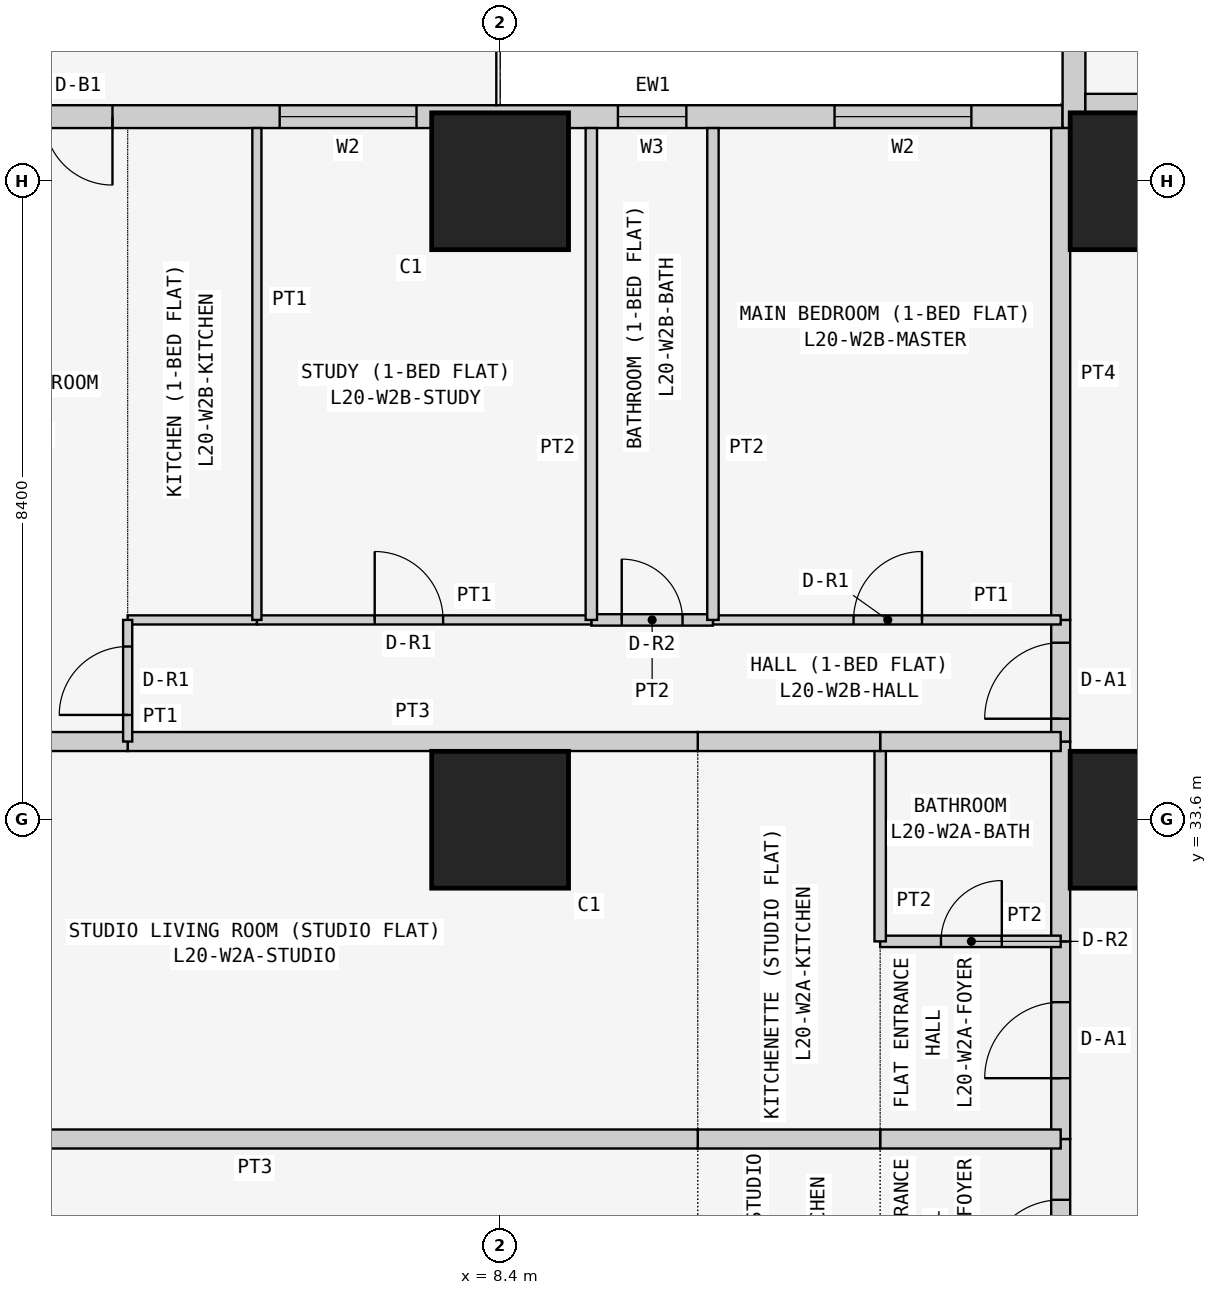
"""IFC4 building model, lengths in metres.
Left out: names, types, materials, properties, quantities, classifications, styles, units other than length and angle.
Written with IfcOpenShell. Run it as: python <this file> out.ifc"""

import sys

from ifc_helpers import new_model, si_unit, direction, frame, frame_2d, origin, origin_2d, place, context, subcontext, project, spatial, rectangle, extrude, element, fill, save


model = new_model("IFC4")
c1 = context("Model", 3, precision=1e-05, world=origin(), true_north=direction((0.0, 1.0)))
c2 = subcontext(c1, "Body", "Model", "MODEL_VIEW")
j1 = project(units=[si_unit("LENGTHUNIT", "METRE"), si_unit("PLANEANGLEUNIT", "RADIAN")], contexts=[c1])
p1 = place(None, origin())
s1 = spatial("IfcSite", under=j1, at=p1, CompositionType="ELEMENT")
p2 = place(p1, origin())
s2 = spatial("IfcBuilding", under=s1, at=p2, CompositionType="ELEMENT")
p3 = place(p2, frame((0.0, 0.0, 81.3)))
s3 = spatial("IfcBuildingStorey", under=s2, at=p3, CompositionType="ELEMENT", Elevation=81.3)
for number, where, z_axis, x_axis in (
    (1, (8.4, 33.6, 0.0), (0.0, 0.0, 1.0), (1.0, 0.0, 0.0)),
    (2, (8.4, 42.0, 0.0), (0.0, 0.0, 1.0), (1.0, 0.0, 0.0)),
    (3, (16.8, 33.6, 0.0), (0.0, 0.0, 1.0), (1.0, 0.0, 0.0)),
    (4, (16.8, 42.0, 0.0), (0.0, 0.0, 1.0), (1.0, 0.0, 0.0)),
):
    element("IfcColumn", number, at=place(p3, frame(where, z_axis=z_axis, x_axis=x_axis)), inside=s3, PredefinedType="COLUMN", context=c2, shape_type="SweptSolid", body=[
        extrude(rectangle(XDim=1.8, YDim=1.8, at=origin_2d()), origin(), (0.0, 0.0, 1.0), 3.6),
    ])
p4 = place(p3, frame((15.8, 42.85, 0.0), z_axis=(0.0, 0.0, 1.0), x_axis=(-1.0, 0.0, 0.0)))
e5 = element("IfcWall", 5, at=p4, inside=s3, PredefinedType="SOLIDWALL", context=c2, shape_type="SweptSolid", body=[
    extrude(rectangle(XDim=15.4, YDim=0.3, at=frame_2d((7.7, 0.0))), origin(), (0.0, 0.0, 1.0), 3.45),
])
p5 = place(p4, frame((1.2, 0.0, 0.9)))
e6 = element("IfcOpeningElement", 6, at=p5, cuts=e5, PredefinedType="OPENING", context=c2, shape_type="SweptSolid", body=[
    extrude(rectangle(XDim=1.8, YDim=1.5, at=frame_2d((0.9, 0.75))), frame((0.0, 0.16, 0.0), z_axis=(0.0, -1.0, 0.0), x_axis=(1.0, 0.0, 0.0)), (0.0, 0.0, 1.0), 0.32),
])
p6 = place(p4, frame((4.95, 0.0, 1.5)))
e7 = element("IfcOpeningElement", 7, at=p6, cuts=e5, PredefinedType="OPENING", context=c2, shape_type="SweptSolid", body=[
    extrude(rectangle(XDim=0.9, YDim=0.7, at=frame_2d((0.45, 0.35))), frame((0.0, 0.16, 0.0), z_axis=(0.0, -1.0, 0.0), x_axis=(1.0, 0.0, 0.0)), (0.0, 0.0, 1.0), 0.32),
])
p7 = place(p4, frame((8.5, 0.0, 0.9)))
e8 = element("IfcOpeningElement", 8, at=p7, cuts=e5, PredefinedType="OPENING", context=c2, shape_type="SweptSolid", body=[
    extrude(rectangle(XDim=1.8, YDim=1.5, at=frame_2d((0.9, 0.75))), frame((0.0, 0.16, 0.0), z_axis=(0.0, -1.0, 0.0), x_axis=(1.0, 0.0, 0.0)), (0.0, 0.0, 1.0), 0.32),
])
p8 = place(p4, frame((12.5, 0.0, 0.0)))
e9 = element("IfcOpeningElement", 9, at=p8, cuts=e5, PredefinedType="OPENING", context=c2, shape_type="SweptSolid", body=[
    extrude(rectangle(XDim=0.9, YDim=2.4, at=frame_2d((0.45, 1.2))), frame((0.0, 0.16, 0.0), z_axis=(0.0, -1.0, 0.0), x_axis=(1.0, 0.0, 0.0)), (0.0, 0.0, 1.0), 0.32),
])
p9 = place(p4, frame((13.5, 0.0, 0.9)))
e10 = element("IfcOpeningElement", 10, at=p9, cuts=e5, PredefinedType="OPENING", context=c2, shape_type="SweptSolid", body=[
    extrude(rectangle(XDim=1.2, YDim=1.5, at=frame_2d((0.6, 0.75))), frame((0.0, 0.16, 0.0), z_axis=(0.0, -1.0, 0.0), x_axis=(1.0, 0.0, 0.0)), (0.0, 0.0, 1.0), 0.32),
])
p10 = place(p3, frame((15.95, 58.4, 0.0), z_axis=(0.0, 0.0, 1.0), x_axis=(0.0, -1.0, 0.0)))
e11 = element("IfcWall", 11, at=p10, inside=s3, PredefinedType="SOLIDWALL", context=c2, shape_type="SweptSolid", body=[
    extrude(rectangle(XDim=15.7, YDim=0.3, at=frame_2d((7.85, 0.0))), origin(), (0.0, 0.0, 1.0), 3.45),
])
p11 = place(p10, frame((12.4, 0.0, 0.9)))
e12 = element("IfcOpeningElement", 12, at=p11, cuts=e11, PredefinedType="OPENING", context=c2, shape_type="SweptSolid", body=[
    extrude(rectangle(XDim=1.8, YDim=1.5, at=frame_2d((0.9, 0.75))), frame((0.0, 0.16, 0.0), z_axis=(0.0, -1.0, 0.0), x_axis=(1.0, 0.0, 0.0)), (0.0, 0.0, 1.0), 0.32),
])
p12 = place(p10, frame((9.55, 0.0, 1.5)))
e13 = element("IfcOpeningElement", 13, at=p12, cuts=e11, PredefinedType="OPENING", context=c2, shape_type="SweptSolid", body=[
    extrude(rectangle(XDim=0.9, YDim=0.7, at=frame_2d((0.45, 0.35))), frame((0.0, 0.16, 0.0), z_axis=(0.0, -1.0, 0.0), x_axis=(1.0, 0.0, 0.0)), (0.0, 0.0, 1.0), 0.32),
])
p13 = place(p10, frame((5.1, 0.0, 0.9)))
e14 = element("IfcOpeningElement", 14, at=p13, cuts=e11, PredefinedType="OPENING", context=c2, shape_type="SweptSolid", body=[
    extrude(rectangle(XDim=1.8, YDim=1.5, at=frame_2d((0.9, 0.75))), frame((0.0, 0.16, 0.0), z_axis=(0.0, -1.0, 0.0), x_axis=(1.0, 0.0, 0.0)), (0.0, 0.0, 1.0), 0.32),
])
p14 = place(p10, frame((2.0, 0.0, 0.0)))
e15 = element("IfcOpeningElement", 15, at=p14, cuts=e11, PredefinedType="OPENING", context=c2, shape_type="SweptSolid", body=[
    extrude(rectangle(XDim=0.9, YDim=2.4, at=frame_2d((0.45, 1.2))), frame((0.0, 0.16, 0.0), z_axis=(0.0, -1.0, 0.0), x_axis=(1.0, 0.0, 0.0)), (0.0, 0.0, 1.0), 0.32),
])
p15 = place(p10, frame((0.7, 0.0, 0.9)))
e16 = element("IfcOpeningElement", 16, at=p15, cuts=e11, PredefinedType="OPENING", context=c2, shape_type="SweptSolid", body=[
    extrude(rectangle(XDim=1.2, YDim=1.5, at=frame_2d((0.6, 0.75))), frame((0.0, 0.16, 0.0), z_axis=(0.0, -1.0, 0.0), x_axis=(1.0, 0.0, 0.0)), (0.0, 0.0, 1.0), 0.32),
])
p16 = place(p3, frame((16.1, 43.025, 0.0), z_axis=(0.0, 0.0, 1.0), x_axis=(1.0, 0.0, 0.0)))
e17 = element("IfcWall", 17, at=p16, inside=s3, PredefinedType="PARTITIONING", context=c2, shape_type="SweptSolid", body=[
    extrude(rectangle(XDim=6.871, YDim=0.25, at=frame_2d((3.436, 0.0))), origin(), (0.0, 0.0, 1.0), 3.45),
])
p17 = place(p3, frame((15.775, 26.8, 0.0), z_axis=(0.0, 0.0, 1.0), x_axis=(0.0, 1.0, 0.0)))
e18 = element("IfcWall", 18, at=p17, inside=s3, PredefinedType="PARTITIONING", context=c2, shape_type="SweptSolid", body=[
    extrude(rectangle(XDim=2.6, YDim=0.25, at=frame_2d((1.3, 0.0))), origin(), (0.0, 0.0, 1.0), 3.45),
])
p18 = place(p17, frame((0.8, 0.0, 0.0)))
e19 = element("IfcOpeningElement", 19, at=p18, cuts=e18, PredefinedType="OPENING", context=c2, shape_type="SweptSolid", body=[
    extrude(rectangle(XDim=1.0, YDim=2.1, at=frame_2d((0.5, 1.05))), frame((0.0, 0.135, 0.0), z_axis=(0.0, -1.0, 0.0), x_axis=(1.0, 0.0, 0.0)), (0.0, 0.0, 1.0), 0.27),
])
p19 = place(p3, frame((15.775, 29.4, 0.0), z_axis=(0.0, 0.0, 1.0), x_axis=(0.0, 1.0, 0.0)))
e20 = element("IfcWall", 20, at=p19, inside=s3, PredefinedType="PARTITIONING", context=c2, shape_type="SweptSolid", body=[
    extrude(rectangle(XDim=2.6, YDim=0.25, at=frame_2d((1.3, 0.0))), origin(), (0.0, 0.0, 1.0), 3.45),
])
p20 = place(p19, frame((0.8, 0.0, 0.0)))
e21 = element("IfcOpeningElement", 21, at=p20, cuts=e20, PredefinedType="OPENING", context=c2, shape_type="SweptSolid", body=[
    extrude(rectangle(XDim=1.0, YDim=2.1, at=frame_2d((0.5, 1.05))), frame((0.0, 0.135, 0.0), z_axis=(0.0, -1.0, 0.0), x_axis=(1.0, 0.0, 0.0)), (0.0, 0.0, 1.0), 0.27),
])
p21 = place(p3, frame((15.775, 32.0, 0.0), z_axis=(0.0, 0.0, 1.0), x_axis=(0.0, 1.0, 0.0)))
e22 = element("IfcWall", 22, at=p21, inside=s3, PredefinedType="PARTITIONING", context=c2, shape_type="SweptSolid", body=[
    extrude(rectangle(XDim=2.629, YDim=0.25, at=frame_2d((1.314, 0.0))), origin(), (0.0, 0.0, 1.0), 3.45),
])
p22 = place(p3, frame((15.775, 34.629, 0.0), z_axis=(0.0, 0.0, 1.0), x_axis=(0.0, 1.0, 0.0)))
e23 = element("IfcWall", 23, at=p22, inside=s3, PredefinedType="PARTITIONING", context=c2, shape_type="SweptSolid", body=[
    extrude(rectangle(XDim=1.6, YDim=0.25, at=frame_2d((0.8, 0.0))), origin(), (0.0, 0.0, 1.0), 3.45),
])
p23 = place(p22, frame((0.3, 0.0, 0.0)))
e24 = element("IfcOpeningElement", 24, at=p23, cuts=e23, PredefinedType="OPENING", context=c2, shape_type="SweptSolid", body=[
    extrude(rectangle(XDim=1.0, YDim=2.1, at=frame_2d((0.5, 1.05))), frame((0.0, 0.135, 0.0), z_axis=(0.0, -1.0, 0.0), x_axis=(1.0, 0.0, 0.0)), (0.0, 0.0, 1.0), 0.27),
])
p24 = place(p3, frame((15.775, 36.229, 0.0), z_axis=(0.0, 0.0, 1.0), x_axis=(0.0, 1.0, 0.0)))
e25 = element("IfcWall", 25, at=p24, inside=s3, PredefinedType="PARTITIONING", context=c2, shape_type="SweptSolid", body=[
    extrude(rectangle(XDim=6.471, YDim=0.25, at=frame_2d((3.235, 0.0))), origin(), (0.0, 0.0, 1.0), 3.45),
])
p25 = place(p3, frame((15.775, 29.4, 0.0), z_axis=(0.0, 0.0, 1.0), x_axis=(-1.0, 0.0, 0.0)))
e26 = element("IfcWall", 26, at=p25, inside=s3, PredefinedType="PARTITIONING", context=c2, shape_type="SweptSolid", body=[
    extrude(rectangle(XDim=2.375, YDim=0.25, at=frame_2d((1.188, 0.0))), origin(), (0.0, 0.0, 1.0), 3.45),
])
p26 = place(p3, frame((13.4, 29.4, 0.0), z_axis=(0.0, 0.0, 1.0), x_axis=(-1.0, 0.0, 0.0)))
e27 = element("IfcWall", 27, at=p26, inside=s3, PredefinedType="PARTITIONING", context=c2, shape_type="SweptSolid", body=[
    extrude(rectangle(XDim=2.4, YDim=0.25, at=frame_2d((1.2, 0.0))), origin(), (0.0, 0.0, 1.0), 3.45),
])
p27 = place(p3, frame((11.0, 29.4, 0.0), z_axis=(0.0, 0.0, 1.0), x_axis=(-1.0, 0.0, 0.0)))
e28 = element("IfcWall", 28, at=p27, inside=s3, PredefinedType="PARTITIONING", context=c2, shape_type="SweptSolid", body=[
    extrude(rectangle(XDim=11.65, YDim=0.25, at=frame_2d((5.825, 0.0))), origin(), (0.0, 0.0, 1.0), 3.45),
])
p28 = place(p3, frame((13.4, 32.0, 0.0), z_axis=(0.0, 0.0, 1.0), x_axis=(1.0, 0.0, 0.0)))
e29 = element("IfcWall", 29, at=p28, inside=s3, PredefinedType="PARTITIONING", context=c2, shape_type="SweptSolid", body=[
    extrude(rectangle(XDim=2.375, YDim=0.15, at=frame_2d((1.188, 0.0))), origin(), (0.0, 0.0, 1.0), 3.45),
])
p29 = place(p28, frame((0.8, 0.0, 0.0)))
e30 = element("IfcOpeningElement", 30, at=p29, cuts=e29, PredefinedType="OPENING", context=c2, shape_type="SweptSolid", body=[
    extrude(rectangle(XDim=0.8, YDim=2.1, at=frame_2d((0.4, 1.05))), frame((0.0, 0.085, 0.0), z_axis=(0.0, -1.0, 0.0), x_axis=(1.0, 0.0, 0.0)), (0.0, 0.0, 1.0), 0.17),
])
p30 = place(p3, frame((13.4, 32.0, 0.0), z_axis=(0.0, 0.0, 1.0), x_axis=(0.0, 1.0, 0.0)))
e31 = element("IfcWall", 31, at=p30, inside=s3, PredefinedType="PARTITIONING", context=c2, shape_type="SweptSolid", body=[
    extrude(rectangle(XDim=2.629, YDim=0.15, at=frame_2d((1.314, 0.0))), origin(), (0.0, 0.0, 1.0), 3.45),
])
p31 = place(p3, frame((13.4, 34.629, 0.0), z_axis=(0.0, 0.0, 1.0), x_axis=(1.0, 0.0, 0.0)))
e32 = element("IfcWall", 32, at=p31, inside=s3, PredefinedType="PARTITIONING", context=c2, shape_type="SweptSolid", body=[
    extrude(rectangle(XDim=2.375, YDim=0.25, at=frame_2d((1.188, 0.0))), origin(), (0.0, 0.0, 1.0), 3.45),
])
p32 = place(p3, frame((11.0, 34.629, 0.0), z_axis=(0.0, 0.0, 1.0), x_axis=(1.0, 0.0, 0.0)))
e33 = element("IfcWall", 33, at=p32, inside=s3, PredefinedType="PARTITIONING", context=c2, shape_type="SweptSolid", body=[
    extrude(rectangle(XDim=2.4, YDim=0.25, at=frame_2d((1.2, 0.0))), origin(), (0.0, 0.0, 1.0), 3.45),
])
p33 = place(p3, frame((3.5, 34.629, 0.0), z_axis=(0.0, 0.0, 1.0), x_axis=(1.0, 0.0, 0.0)))
e34 = element("IfcWall", 34, at=p33, inside=s3, PredefinedType="PARTITIONING", context=c2, shape_type="SweptSolid", body=[
    extrude(rectangle(XDim=7.5, YDim=0.25, at=frame_2d((3.75, 0.0))), origin(), (0.0, 0.0, 1.0), 3.45),
])
p34 = place(p3, frame((-0.65, 34.629, 0.0), z_axis=(0.0, 0.0, 1.0), x_axis=(1.0, 0.0, 0.0)))
e35 = element("IfcWall", 35, at=p34, inside=s3, PredefinedType="PARTITIONING", context=c2, shape_type="SweptSolid", body=[
    extrude(rectangle(XDim=4.15, YDim=0.25, at=frame_2d((2.075, 0.0))), origin(), (0.0, 0.0, 1.0), 3.45),
])
p35 = place(p3, frame((11.2, 36.229, 0.0), z_axis=(0.0, 0.0, 1.0), x_axis=(1.0, 0.0, 0.0)))
e36 = element("IfcWall", 36, at=p35, inside=s3, PredefinedType="PARTITIONING", context=c2, shape_type="SweptSolid", body=[
    extrude(rectangle(XDim=4.575, YDim=0.12, at=frame_2d((2.288, 0.0))), origin(), (0.0, 0.0, 1.0), 3.45),
])
p36 = place(p35, frame((1.85, 0.0, 0.0)))
e37 = element("IfcOpeningElement", 37, at=p36, cuts=e36, PredefinedType="OPENING", context=c2, shape_type="SweptSolid", body=[
    extrude(rectangle(XDim=0.9, YDim=2.1, at=frame_2d((0.45, 1.05))), frame((0.0, 0.07, 0.0), z_axis=(0.0, -1.0, 0.0), x_axis=(1.0, 0.0, 0.0)), (0.0, 0.0, 1.0), 0.14),
])
p37 = place(p3, frame((9.6, 36.229, 0.0), z_axis=(0.0, 0.0, 1.0), x_axis=(1.0, 0.0, 0.0)))
e38 = element("IfcWall", 38, at=p37, inside=s3, PredefinedType="PARTITIONING", context=c2, shape_type="SweptSolid", body=[
    extrude(rectangle(XDim=1.6, YDim=0.15, at=frame_2d((0.8, 0.0))), origin(), (0.0, 0.0, 1.0), 3.45),
])
p38 = place(p37, frame((0.4, 0.0, 0.0)))
e39 = element("IfcOpeningElement", 39, at=p38, cuts=e38, PredefinedType="OPENING", context=c2, shape_type="SweptSolid", body=[
    extrude(rectangle(XDim=0.8, YDim=2.1, at=frame_2d((0.4, 1.05))), frame((0.0, 0.085, 0.0), z_axis=(0.0, -1.0, 0.0), x_axis=(1.0, 0.0, 0.0)), (0.0, 0.0, 1.0), 0.17),
])
p39 = place(p3, frame((5.2, 36.229, 0.0), z_axis=(0.0, 0.0, 1.0), x_axis=(1.0, 0.0, 0.0)))
e40 = element("IfcWall", 40, at=p39, inside=s3, PredefinedType="PARTITIONING", context=c2, shape_type="SweptSolid", body=[
    extrude(rectangle(XDim=4.4, YDim=0.12, at=frame_2d((2.2, 0.0))), origin(), (0.0, 0.0, 1.0), 3.45),
])
p40 = place(p39, frame((1.55, 0.0, 0.0)))
e41 = element("IfcOpeningElement", 41, at=p40, cuts=e40, PredefinedType="OPENING", context=c2, shape_type="SweptSolid", body=[
    extrude(rectangle(XDim=0.9, YDim=2.1, at=frame_2d((0.45, 1.05))), frame((0.0, 0.07, 0.0), z_axis=(0.0, -1.0, 0.0), x_axis=(1.0, 0.0, 0.0)), (0.0, 0.0, 1.0), 0.14),
])
p41 = place(p3, frame((3.5, 36.229, 0.0), z_axis=(0.0, 0.0, 1.0), x_axis=(1.0, 0.0, 0.0)))
e42 = element("IfcWall", 42, at=p41, inside=s3, PredefinedType="PARTITIONING", context=c2, shape_type="SweptSolid", body=[
    extrude(rectangle(XDim=1.7, YDim=0.12, at=frame_2d((0.85, 0.0))), origin(), (0.0, 0.0, 1.0), 3.45),
])
p42 = place(p3, frame((3.5, 34.629, 0.0), z_axis=(0.0, 0.0, 1.0), x_axis=(0.0, 1.0, 0.0)))
e43 = element("IfcWall", 43, at=p42, inside=s3, PredefinedType="PARTITIONING", context=c2, shape_type="SweptSolid", body=[
    extrude(rectangle(XDim=1.6, YDim=0.12, at=frame_2d((0.8, 0.0))), origin(), (0.0, 0.0, 1.0), 3.45),
])
p43 = place(p42, frame((0.35, 0.0, 0.0)))
e44 = element("IfcOpeningElement", 44, at=p43, cuts=e43, PredefinedType="OPENING", context=c2, shape_type="SweptSolid", body=[
    extrude(rectangle(XDim=0.9, YDim=2.1, at=frame_2d((0.45, 1.05))), frame((0.0, 0.07, 0.0), z_axis=(0.0, -1.0, 0.0), x_axis=(1.0, 0.0, 0.0)), (0.0, 0.0, 1.0), 0.14),
])
for number, where, z_axis, x_axis in (
    (45, (11.2, 36.229, 0.0), (0.0, 0.0, 1.0), (0.0, 1.0, 0.0)),
    (46, (9.6, 36.229, 0.0), (0.0, 0.0, 1.0), (0.0, 1.0, 0.0)),
):
    element("IfcWall", number, at=place(p3, frame(where, z_axis=z_axis, x_axis=x_axis)), inside=s3, PredefinedType="PARTITIONING", context=c2, shape_type="SweptSolid", body=[
        extrude(rectangle(XDim=6.471, YDim=0.15, at=frame_2d((3.235, 0.0))), origin(), (0.0, 0.0, 1.0), 3.45),
    ])
p44 = place(p3, frame((5.2, 36.229, 0.0), z_axis=(0.0, 0.0, 1.0), x_axis=(0.0, 1.0, 0.0)))
e47 = element("IfcWall", 47, at=p44, inside=s3, PredefinedType="PARTITIONING", context=c2, shape_type="SweptSolid", body=[
    extrude(rectangle(XDim=6.471, YDim=0.12, at=frame_2d((3.235, 0.0))), origin(), (0.0, 0.0, 1.0), 3.45),
])
p45 = place(p5, origin())
e48 = element("IfcWindow", 48, at=p45, inside=s3, PartitioningType="SINGLE_PANEL", PredefinedType="WINDOW", context=c2, shape_type="SweptSolid", body=[
    extrude(rectangle(XDim=1.8, YDim=1.5, at=frame_2d((0.9, 0.75))), frame((0.0, 0.03, 0.0), z_axis=(0.0, -1.0, 0.0), x_axis=(1.0, 0.0, 0.0)), (0.0, 0.0, 1.0), 0.06),
])
fill(e6, e48)
p46 = place(p6, origin())
e49 = element("IfcWindow", 49, at=p46, inside=s3, PartitioningType="SINGLE_PANEL", PredefinedType="WINDOW", context=c2, shape_type="SweptSolid", body=[
    extrude(rectangle(XDim=0.9, YDim=0.7, at=frame_2d((0.45, 0.35))), frame((0.0, 0.03, 0.0), z_axis=(0.0, -1.0, 0.0), x_axis=(1.0, 0.0, 0.0)), (0.0, 0.0, 1.0), 0.06),
])
fill(e7, e49)
p47 = place(p7, origin())
e50 = element("IfcWindow", 50, at=p47, inside=s3, PartitioningType="SINGLE_PANEL", PredefinedType="WINDOW", context=c2, shape_type="SweptSolid", body=[
    extrude(rectangle(XDim=1.8, YDim=1.5, at=frame_2d((0.9, 0.75))), frame((0.0, 0.03, 0.0), z_axis=(0.0, -1.0, 0.0), x_axis=(1.0, 0.0, 0.0)), (0.0, 0.0, 1.0), 0.06),
])
fill(e8, e50)
p48 = place(p8, origin())
e51 = element("IfcDoor", 51, at=p48, inside=s3, OperationType="SINGLE_SWING_LEFT", PredefinedType="DOOR", context=c2, shape_type="SweptSolid", body=[
    extrude(rectangle(XDim=0.9, YDim=2.4, at=frame_2d((0.45, 1.2))), frame((0.0, 0.025, 0.0), z_axis=(0.0, -1.0, 0.0), x_axis=(1.0, 0.0, 0.0)), (0.0, 0.0, 1.0), 0.05),
])
fill(e9, e51)
p49 = place(p18, origin())
e52 = element("IfcDoor", 52, at=p49, inside=s3, OperationType="SINGLE_SWING_LEFT", PredefinedType="DOOR", context=c2, shape_type="SweptSolid", body=[
    extrude(rectangle(XDim=1.0, YDim=2.1, at=frame_2d((0.5, 1.05))), frame((0.0, 0.025, 0.0), z_axis=(0.0, -1.0, 0.0), x_axis=(1.0, 0.0, 0.0)), (0.0, 0.0, 1.0), 0.05),
])
fill(e19, e52)
p50 = place(p20, origin())
e53 = element("IfcDoor", 53, at=p50, inside=s3, OperationType="SINGLE_SWING_LEFT", PredefinedType="DOOR", context=c2, shape_type="SweptSolid", body=[
    extrude(rectangle(XDim=1.0, YDim=2.1, at=frame_2d((0.5, 1.05))), frame((0.0, 0.025, 0.0), z_axis=(0.0, -1.0, 0.0), x_axis=(1.0, 0.0, 0.0)), (0.0, 0.0, 1.0), 0.05),
])
fill(e21, e53)
p51 = place(p29, origin())
e54 = element("IfcDoor", 54, at=p51, inside=s3, OperationType="SINGLE_SWING_RIGHT", PredefinedType="DOOR", context=c2, shape_type="SweptSolid", body=[
    extrude(rectangle(XDim=0.8, YDim=2.1, at=frame_2d((0.4, 1.05))), frame((0.0, 0.025, 0.0), z_axis=(0.0, -1.0, 0.0), x_axis=(1.0, 0.0, 0.0)), (0.0, 0.0, 1.0), 0.05),
])
fill(e30, e54)
p52 = place(p23, origin())
e55 = element("IfcDoor", 55, at=p52, inside=s3, OperationType="SINGLE_SWING_LEFT", PredefinedType="DOOR", context=c2, shape_type="SweptSolid", body=[
    extrude(rectangle(XDim=1.0, YDim=2.1, at=frame_2d((0.5, 1.05))), frame((0.0, 0.025, 0.0), z_axis=(0.0, -1.0, 0.0), x_axis=(1.0, 0.0, 0.0)), (0.0, 0.0, 1.0), 0.05),
])
fill(e24, e55)
p53 = place(p36, origin())
e56 = element("IfcDoor", 56, at=p53, inside=s3, OperationType="SINGLE_SWING_RIGHT", PredefinedType="DOOR", context=c2, shape_type="SweptSolid", body=[
    extrude(rectangle(XDim=0.9, YDim=2.1, at=frame_2d((0.45, 1.05))), frame((0.0, 0.025, 0.0), z_axis=(0.0, -1.0, 0.0), x_axis=(1.0, 0.0, 0.0)), (0.0, 0.0, 1.0), 0.05),
])
fill(e37, e56)
p54 = place(p38, origin())
e57 = element("IfcDoor", 57, at=p54, inside=s3, OperationType="SINGLE_SWING_LEFT", PredefinedType="DOOR", context=c2, shape_type="SweptSolid", body=[
    extrude(rectangle(XDim=0.8, YDim=2.1, at=frame_2d((0.4, 1.05))), frame((0.0, 0.025, 0.0), z_axis=(0.0, -1.0, 0.0), x_axis=(1.0, 0.0, 0.0)), (0.0, 0.0, 1.0), 0.05),
])
fill(e39, e57)
p55 = place(p40, origin())
e58 = element("IfcDoor", 58, at=p55, inside=s3, OperationType="SINGLE_SWING_LEFT", PredefinedType="DOOR", context=c2, shape_type="SweptSolid", body=[
    extrude(rectangle(XDim=0.9, YDim=2.1, at=frame_2d((0.45, 1.05))), frame((0.0, 0.025, 0.0), z_axis=(0.0, -1.0, 0.0), x_axis=(1.0, 0.0, 0.0)), (0.0, 0.0, 1.0), 0.05),
])
fill(e41, e58)
p56 = place(p43, origin())
e59 = element("IfcDoor", 59, at=p56, inside=s3, OperationType="SINGLE_SWING_LEFT", PredefinedType="DOOR", context=c2, shape_type="SweptSolid", body=[
    extrude(rectangle(XDim=0.9, YDim=2.1, at=frame_2d((0.45, 1.05))), frame((0.0, 0.025, 0.0), z_axis=(0.0, -1.0, 0.0), x_axis=(1.0, 0.0, 0.0)), (0.0, 0.0, 1.0), 0.05),
])
fill(e44, e59)
save(model, sys.argv[1])
